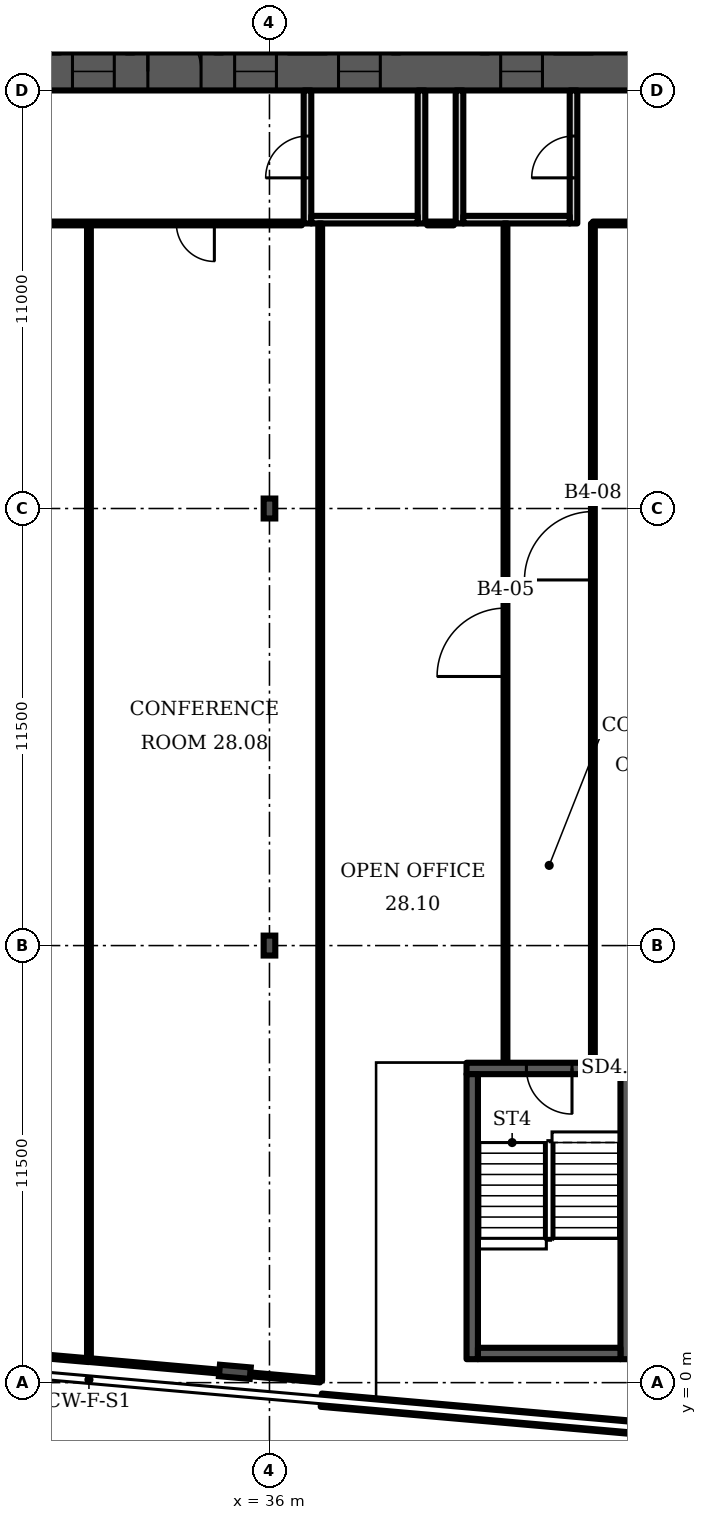
"""IFC4 building model, lengths in metres.
Left out: names, types, materials, properties, quantities, classifications, styles, units other than length and angle.
Written with IfcOpenShell. Run it as: python <this file> out.ifc"""

import sys

from ifc_helpers import new_model, si_unit, direction, frame, frame_2d, origin, origin_2d, place, context, subcontext, project, spatial, rectangle, i_section, extrude, element, fill, save


model = new_model("IFC4")
c1 = context("Model", 3, precision=1e-05, world=origin(), true_north=direction((0.0, 1.0)))
c2 = subcontext(c1, "Body", "Model", "MODEL_VIEW")
j1 = project(units=[si_unit("LENGTHUNIT", "METRE"), si_unit("PLANEANGLEUNIT", "RADIAN")], contexts=[c1])
p1 = place(None, origin())
s1 = spatial("IfcSite", under=j1, at=p1, CompositionType="ELEMENT")
p2 = place(p1, origin())
s2 = spatial("IfcBuilding", under=s1, at=p2, CompositionType="ELEMENT")
p3 = place(p2, frame((0.0, 0.0, 121.9)))
s3 = spatial("IfcBuildingStorey", under=s2, at=p3, CompositionType="ELEMENT", Elevation=121.9)
p4 = place(p3, frame((16.0, 34.5, 0.0), z_axis=(0.0, 0.0, 1.0), x_axis=(1.0, 0.0, 0.0)))
e1 = element("IfcWall", 1, at=p4, inside=s3, PredefinedType="SHEAR", context=c2, shape_type="SweptSolid", body=[
    extrude(rectangle(XDim=49.0, YDim=1.0, at=frame_2d((24.5, 0.0))), origin(), (0.0, 0.0, 1.0), 3.6),
])
p5 = place(p4, frame((1.2, 0.0, 0.0)))
e2 = element("IfcOpeningElement", 2, at=p5, cuts=e1, PredefinedType="OPENING", context=c2, shape_type="SweptSolid", body=[
    extrude(rectangle(XDim=1.1, YDim=2.1, at=frame_2d((0.55, 1.05))), frame((0.0, 0.51, 0.0), z_axis=(0.0, -1.0, 0.0), x_axis=(1.0, 0.0, 0.0)), (0.0, 0.0, 1.0), 1.02),
])
p6 = place(p4, frame((5.083, 0.0, 0.0)))
e3 = element("IfcOpeningElement", 3, at=p6, cuts=e1, PredefinedType="OPENING", context=c2, shape_type="SweptSolid", body=[
    extrude(rectangle(XDim=1.1, YDim=2.1, at=frame_2d((0.55, 1.05))), frame((0.0, 0.51, 0.0), z_axis=(0.0, -1.0, 0.0), x_axis=(1.0, 0.0, 0.0)), (0.0, 0.0, 1.0), 1.02),
])
p7 = place(p4, frame((2.933, 0.0, 0.0)))
e4 = element("IfcOpeningElement", 4, at=p7, cuts=e1, PredefinedType="OPENING", context=c2, shape_type="SweptSolid", body=[
    extrude(rectangle(XDim=1.4, YDim=2.1, at=frame_2d((0.7, 1.05))), frame((0.0, 0.51, 0.0), z_axis=(0.0, -1.0, 0.0), x_axis=(1.0, 0.0, 0.0)), (0.0, 0.0, 1.0), 1.02),
])
p8 = place(p4, frame((7.65, 0.0, 0.0)))
e5 = element("IfcOpeningElement", 5, at=p8, cuts=e1, PredefinedType="OPENING", context=c2, shape_type="SweptSolid", body=[
    extrude(rectangle(XDim=1.2, YDim=2.1, at=frame_2d((0.6, 1.05))), frame((0.0, 0.51, 0.0), z_axis=(0.0, -1.0, 0.0), x_axis=(1.0, 0.0, 0.0)), (0.0, 0.0, 1.0), 1.02),
])
p9 = place(p4, frame((14.817, 0.0, 0.0)))
e6 = element("IfcOpeningElement", 6, at=p9, cuts=e1, PredefinedType="OPENING", context=c2, shape_type="SweptSolid", body=[
    extrude(rectangle(XDim=1.1, YDim=2.1, at=frame_2d((0.55, 1.05))), frame((0.0, 0.51, 0.0), z_axis=(0.0, -1.0, 0.0), x_axis=(1.0, 0.0, 0.0)), (0.0, 0.0, 1.0), 1.02),
])
p10 = place(p4, frame((19.083, 0.0, 0.0)))
e7 = element("IfcOpeningElement", 7, at=p10, cuts=e1, PredefinedType="OPENING", context=c2, shape_type="SweptSolid", body=[
    extrude(rectangle(XDim=1.1, YDim=2.1, at=frame_2d((0.55, 1.05))), frame((0.0, 0.51, 0.0), z_axis=(0.0, -1.0, 0.0), x_axis=(1.0, 0.0, 0.0)), (0.0, 0.0, 1.0), 1.02),
])
p11 = place(p4, frame((16.8, 0.0, 0.0)))
e8 = element("IfcOpeningElement", 8, at=p11, cuts=e1, PredefinedType="OPENING", context=c2, shape_type="SweptSolid", body=[
    extrude(rectangle(XDim=1.4, YDim=2.1, at=frame_2d((0.7, 1.05))), frame((0.0, 0.51, 0.0), z_axis=(0.0, -1.0, 0.0), x_axis=(1.0, 0.0, 0.0)), (0.0, 0.0, 1.0), 1.02),
])
p12 = place(p4, frame((21.817, 0.0, 0.0)))
e9 = element("IfcOpeningElement", 9, at=p12, cuts=e1, PredefinedType="OPENING", context=c2, shape_type="SweptSolid", body=[
    extrude(rectangle(XDim=1.1, YDim=2.1, at=frame_2d((0.55, 1.05))), frame((0.0, 0.51, 0.0), z_axis=(0.0, -1.0, 0.0), x_axis=(1.0, 0.0, 0.0)), (0.0, 0.0, 1.0), 1.02),
])
p13 = place(p4, frame((26.083, 0.0, 0.0)))
e10 = element("IfcOpeningElement", 10, at=p13, cuts=e1, PredefinedType="OPENING", context=c2, shape_type="SweptSolid", body=[
    extrude(rectangle(XDim=1.1, YDim=2.1, at=frame_2d((0.55, 1.05))), frame((0.0, 0.51, 0.0), z_axis=(0.0, -1.0, 0.0), x_axis=(1.0, 0.0, 0.0)), (0.0, 0.0, 1.0), 1.02),
])
p14 = place(p4, frame((33.15, 0.0, 0.0)))
e11 = element("IfcOpeningElement", 11, at=p14, cuts=e1, PredefinedType="OPENING", context=c2, shape_type="SweptSolid", body=[
    extrude(rectangle(XDim=1.2, YDim=2.1, at=frame_2d((0.6, 1.05))), frame((0.0, 0.51, 0.0), z_axis=(0.0, -1.0, 0.0), x_axis=(1.0, 0.0, 0.0)), (0.0, 0.0, 1.0), 1.02),
])
p15 = place(p4, frame((37.8, 0.0, 0.0)))
e12 = element("IfcOpeningElement", 12, at=p15, cuts=e1, PredefinedType="OPENING", context=c2, shape_type="SweptSolid", body=[
    extrude(rectangle(XDim=1.4, YDim=2.1, at=frame_2d((0.7, 1.05))), frame((0.0, 0.51, 0.0), z_axis=(0.0, -1.0, 0.0), x_axis=(1.0, 0.0, 0.0)), (0.0, 0.0, 1.0), 1.02),
])
p16 = place(p4, frame((42.817, 0.0, 0.0)))
e13 = element("IfcOpeningElement", 13, at=p16, cuts=e1, PredefinedType="OPENING", context=c2, shape_type="SweptSolid", body=[
    extrude(rectangle(XDim=1.1, YDim=2.1, at=frame_2d((0.55, 1.05))), frame((0.0, 0.51, 0.0), z_axis=(0.0, -1.0, 0.0), x_axis=(1.0, 0.0, 0.0)), (0.0, 0.0, 1.0), 1.02),
])
p17 = place(p4, frame((46.7, 0.0, 0.0)))
e14 = element("IfcOpeningElement", 14, at=p17, cuts=e1, PredefinedType="OPENING", context=c2, shape_type="SweptSolid", body=[
    extrude(rectangle(XDim=1.1, YDim=2.1, at=frame_2d((0.55, 1.05))), frame((0.0, 0.51, 0.0), z_axis=(0.0, -1.0, 0.0), x_axis=(1.0, 0.0, 0.0)), (0.0, 0.0, 1.0), 1.02),
])
p18 = place(p4, frame((44.667, 0.0, 0.0)))
e15 = element("IfcOpeningElement", 15, at=p18, cuts=e1, PredefinedType="OPENING", context=c2, shape_type="SweptSolid", body=[
    extrude(rectangle(XDim=1.4, YDim=2.1, at=frame_2d((0.7, 1.05))), frame((0.0, 0.51, 0.0), z_axis=(0.0, -1.0, 0.0), x_axis=(1.0, 0.0, 0.0)), (0.0, 0.0, 1.0), 1.02),
])
p19 = place(p3, frame((35.089, 0.285, 0.0), z_axis=(0.0, 0.0, 1.0), x_axis=(-0.087156, -0.996198, 0.0)))
e16 = element("IfcColumn", 16, at=p19, inside=s3, PredefinedType="COLUMN", context=c2, shape_type="SweptSolid", body=[
    extrude(i_section(OverallWidth=0.303, OverallDepth=0.814, WebThickness=0.021, FlangeThickness=0.04, FilletRadius=0.03, at=origin_2d()), origin(), (0.0, 0.0, 1.0), 3.6),
])
for number, where, z_axis, x_axis in (
    (17, (36.0, 11.5, 0.0), (0.0, 0.0, 1.0), (1.0, 0.0, 0.0)),
    (18, (36.0, 23.0, 0.0), (0.0, 0.0, 1.0), (1.0, 0.0, 0.0)),
):
    element("IfcColumn", number, at=place(p3, frame(where, z_axis=z_axis, x_axis=x_axis)), inside=s3, PredefinedType="COLUMN", context=c2, shape_type="SweptSolid", body=[
        extrude(i_section(OverallWidth=0.306, OverallDepth=0.524, WebThickness=0.021, FlangeThickness=0.04, FilletRadius=0.027, at=origin_2d()), origin(), (0.0, 0.0, 1.0), 3.6),
    ])
p20 = place(p3, frame((37.363, -0.461, 0.0), z_axis=(0.0, 0.0, 1.0), x_axis=(0.996194, -0.087159, 0.0)))
e19 = element("IfcWall", 19, at=p20, inside=s3, PredefinedType="SOLIDWALL", context=c2, shape_type="SweptSolid", body=[
    extrude(rectangle(XDim=12.199, YDim=0.35, at=frame_2d((6.099, 0.0))), origin(), (0.0, 0.0, 1.0), 1.0),
])
p21 = place(p3, frame((37.0, 30.5, 0.0), z_axis=(0.0, 0.0, 1.0), x_axis=(0.0, 1.0, 0.0)))
e20 = element("IfcWall", 20, at=p21, inside=s3, PredefinedType="PARTITIONING", context=c2, shape_type="SweptSolid", body=[
    extrude(rectangle(XDim=3.5, YDim=0.2, at=frame_2d((1.75, 0.0))), origin(), (0.0, 0.0, 1.0), 3.2),
])
p22 = place(p21, frame((1.2, 0.0, 0.0)))
e21 = element("IfcOpeningElement", 21, at=p22, cuts=e20, PredefinedType="OPENING", context=c2, shape_type="SweptSolid", body=[
    extrude(rectangle(XDim=1.1, YDim=2.1, at=frame_2d((0.55, 1.05))), frame((0.0, 0.11, 0.0), z_axis=(0.0, -1.0, 0.0), x_axis=(1.0, 0.0, 0.0)), (0.0, 0.0, 1.0), 0.22),
])
p23 = place(p3, frame((40.0, 30.5, 0.0), z_axis=(0.0, 0.0, 1.0), x_axis=(0.0, 1.0, 0.0)))
e22 = element("IfcWall", 22, at=p23, inside=s3, PredefinedType="PARTITIONING", context=c2, shape_type="SweptSolid", body=[
    extrude(rectangle(XDim=3.5, YDim=0.2, at=frame_2d((1.75, 0.0))), origin(), (0.0, 0.0, 1.0), 3.2),
])
p24 = place(p3, frame((37.1, 30.6, 0.0), z_axis=(0.0, 0.0, 1.0), x_axis=(1.0, 0.0, 0.0)))
e23 = element("IfcWall", 23, at=p24, inside=s3, PredefinedType="PARTITIONING", context=c2, shape_type="SweptSolid", body=[
    extrude(rectangle(XDim=2.8, YDim=0.2, at=frame_2d((1.4, 0.0))), origin(), (0.0, 0.0, 1.0), 3.2),
])
p25 = place(p3, frame((41.0, 30.5, 0.0), z_axis=(0.0, 0.0, 1.0), x_axis=(0.0, 1.0, 0.0)))
e24 = element("IfcWall", 24, at=p25, inside=s3, PredefinedType="PARTITIONING", context=c2, shape_type="SweptSolid", body=[
    extrude(rectangle(XDim=3.5, YDim=0.2, at=frame_2d((1.75, 0.0))), origin(), (0.0, 0.0, 1.0), 3.2),
])
p26 = place(p3, frame((44.0, 30.5, 0.0), z_axis=(0.0, 0.0, 1.0), x_axis=(0.0, 1.0, 0.0)))
e25 = element("IfcWall", 25, at=p26, inside=s3, PredefinedType="PARTITIONING", context=c2, shape_type="SweptSolid", body=[
    extrude(rectangle(XDim=3.5, YDim=0.2, at=frame_2d((1.75, 0.0))), origin(), (0.0, 0.0, 1.0), 3.2),
])
p27 = place(p26, frame((1.2, 0.0, 0.0)))
e26 = element("IfcOpeningElement", 26, at=p27, cuts=e25, PredefinedType="OPENING", context=c2, shape_type="SweptSolid", body=[
    extrude(rectangle(XDim=1.1, YDim=2.1, at=frame_2d((0.55, 1.05))), frame((0.0, 0.11, 0.0), z_axis=(0.0, -1.0, 0.0), x_axis=(1.0, 0.0, 0.0)), (0.0, 0.0, 1.0), 0.22),
])
p28 = place(p3, frame((41.1, 30.6, 0.0), z_axis=(0.0, 0.0, 1.0), x_axis=(1.0, 0.0, 0.0)))
e27 = element("IfcWall", 27, at=p28, inside=s3, PredefinedType="PARTITIONING", context=c2, shape_type="SweptSolid", body=[
    extrude(rectangle(XDim=2.8, YDim=0.2, at=frame_2d((1.4, 0.0))), origin(), (0.0, 0.0, 1.0), 3.2),
])
p29 = place(p3, frame((41.185, 8.267, 0.0), z_axis=(0.0, 0.0, 1.0), x_axis=(1.0, 0.0, 0.0)))
e28 = element("IfcWall", 28, at=p29, inside=s3, PredefinedType="SHEAR", context=c2, shape_type="SweptSolid", body=[
    extrude(rectangle(XDim=4.35, YDim=0.3, at=frame_2d((2.175, 0.0))), origin(), (0.0, 0.0, 1.0), 3.2),
])
p30 = place(p29, frame((1.575, 0.0, 0.0)))
e29 = element("IfcOpeningElement", 29, at=p30, cuts=e28, PredefinedType="OPENING", context=c2, shape_type="SweptSolid", body=[
    extrude(rectangle(XDim=1.2, YDim=2.1, at=frame_2d((0.6, 1.05))), frame((0.0, 0.16, 0.0), z_axis=(0.0, -1.0, 0.0), x_axis=(1.0, 0.0, 0.0)), (0.0, 0.0, 1.0), 0.32),
])
p31 = place(p3, frame((17.8, 30.5, 0.0), z_axis=(0.0, 0.0, 1.0), x_axis=(1.0, 0.0, 0.0)))
e30 = element("IfcWall", 30, at=p31, inside=s3, PredefinedType="PARTITIONING", context=c2, shape_type="SweptSolid", body=[
    extrude(rectangle(XDim=19.05, YDim=0.1, at=frame_2d((9.525, 0.0))), origin(), (0.0, 0.0, 1.0), 3.2),
])
p32 = place(p31, frame((2.9, 0.0, 0.0)))
e31 = element("IfcOpeningElement", 31, at=p32, cuts=e30, PredefinedType="OPENING", context=c2, shape_type="SweptSolid", body=[
    extrude(rectangle(XDim=1.8, YDim=2.1, at=frame_2d((0.9, 1.05))), frame((0.0, 0.06, 0.0), z_axis=(0.0, -1.0, 0.0), x_axis=(1.0, 0.0, 0.0)), (0.0, 0.0, 1.0), 0.12),
])
p33 = place(p31, frame((9.99, 0.0, 0.0)))
e32 = element("IfcOpeningElement", 32, at=p33, cuts=e30, PredefinedType="OPENING", context=c2, shape_type="SweptSolid", body=[
    extrude(rectangle(XDim=1.0, YDim=2.1, at=frame_2d((0.5, 1.05))), frame((0.0, 0.06, 0.0), z_axis=(0.0, -1.0, 0.0), x_axis=(1.0, 0.0, 0.0)), (0.0, 0.0, 1.0), 0.12),
])
p34 = place(p31, frame((15.75, 0.0, 0.0)))
e33 = element("IfcOpeningElement", 33, at=p34, cuts=e30, PredefinedType="OPENING", context=c2, shape_type="SweptSolid", body=[
    extrude(rectangle(XDim=1.0, YDim=2.1, at=frame_2d((0.5, 1.05))), frame((0.0, 0.06, 0.0), z_axis=(0.0, -1.0, 0.0), x_axis=(1.0, 0.0, 0.0)), (0.0, 0.0, 1.0), 0.12),
])
p35 = place(p3, frame((31.25, 0.59, 0.0), z_axis=(0.0, 0.0, 1.0), x_axis=(-0.996218, 0.086845, 0.0)))
e34 = element("IfcWall", 34, at=p35, inside=s3, PredefinedType="PARTITIONING", context=c2, shape_type="SweptSolid", body=[
    extrude(rectangle(XDim=6.103, YDim=0.1, at=frame_2d((3.052, 0.0))), origin(), (0.0, 0.0, 1.0), 2.58),
])
p36 = place(p3, frame((31.25, 0.59, 0.0), z_axis=(0.0, 0.0, 1.0), x_axis=(0.0, 1.0, 0.0)))
e35 = element("IfcWall", 35, at=p36, inside=s3, PredefinedType="PARTITIONING", context=c2, shape_type="SweptSolid", body=[
    extrude(rectangle(XDim=29.91, YDim=0.1, at=frame_2d((14.955, 0.0))), origin(), (0.0, 0.0, 1.0), 3.2),
])
p37 = place(p3, frame((37.335, 0.055, 0.0), z_axis=(0.0, 0.0, 1.0), x_axis=(-0.996095, 0.088253, 0.0)))
e36 = element("IfcWall", 36, at=p37, inside=s3, PredefinedType="PARTITIONING", context=c2, shape_type="SweptSolid", body=[
    extrude(rectangle(XDim=6.105, YDim=0.1, at=frame_2d((3.053, 0.0))), origin(), (0.0, 0.0, 1.0), 2.58),
])
p38 = place(p3, frame((37.335, 0.055, 0.0), z_axis=(0.0, 0.0, 1.0), x_axis=(0.0, 1.0, 0.0)))
e37 = element("IfcWall", 37, at=p38, inside=s3, PredefinedType="PARTITIONING", context=c2, shape_type="SweptSolid", body=[
    extrude(rectangle(XDim=30.445, YDim=0.1, at=frame_2d((15.223, 0.0))), origin(), (0.0, 0.0, 1.0), 3.2),
])
p39 = place(p3, frame((42.21, 8.437, 0.0), z_axis=(0.0, 0.0, 1.0), x_axis=(0.0, 1.0, 0.0)))
e38 = element("IfcWall", 38, at=p39, inside=s3, PredefinedType="PARTITIONING", context=c2, shape_type="SweptSolid", body=[
    extrude(rectangle(XDim=22.063, YDim=0.1, at=frame_2d((11.031, 0.0))), origin(), (0.0, 0.0, 1.0), 3.2),
])
p40 = place(p39, frame((10.143, 0.0, 0.0)))
e39 = element("IfcOpeningElement", 39, at=p40, cuts=e38, PredefinedType="OPENING", context=c2, shape_type="SweptSolid", body=[
    extrude(rectangle(XDim=1.8, YDim=2.1, at=frame_2d((0.9, 1.05))), frame((0.0, 0.06, 0.0), z_axis=(0.0, -1.0, 0.0), x_axis=(1.0, 0.0, 0.0)), (0.0, 0.0, 1.0), 0.12),
])
p41 = place(p3, frame((44.51, 8.437, 0.0), z_axis=(0.0, 0.0, 1.0), x_axis=(0.0, 1.0, 0.0)))
e40 = element("IfcWall", 40, at=p41, inside=s3, PredefinedType="PARTITIONING", context=c2, shape_type="SweptSolid", body=[
    extrude(rectangle(XDim=22.063, YDim=0.1, at=frame_2d((11.031, 0.0))), origin(), (0.0, 0.0, 1.0), 3.2),
])
p42 = place(p41, frame((12.683, 0.0, 0.0)))
e41 = element("IfcOpeningElement", 41, at=p42, cuts=e40, PredefinedType="OPENING", context=c2, shape_type="SweptSolid", body=[
    extrude(rectangle(XDim=1.8, YDim=2.1, at=frame_2d((0.9, 1.05))), frame((0.0, 0.06, 0.0), z_axis=(0.0, -1.0, 0.0), x_axis=(1.0, 0.0, 0.0)), (0.0, 0.0, 1.0), 0.12),
])
p43 = place(p3, frame((44.51, 30.5, 0.0), z_axis=(0.0, 0.0, 1.0), x_axis=(1.0, 0.0, 0.0)))
e42 = element("IfcWall", 42, at=p43, inside=s3, PredefinedType="PARTITIONING", context=c2, shape_type="SweptSolid", body=[
    extrude(rectangle(XDim=19.59, YDim=0.1, at=frame_2d((9.795, 0.0))), origin(), (0.0, 0.0, 1.0), 3.2),
])
p44 = place(p43, frame((6.41, 0.0, 0.0)))
e43 = element("IfcOpeningElement", 43, at=p44, cuts=e42, PredefinedType="OPENING", context=c2, shape_type="SweptSolid", body=[
    extrude(rectangle(XDim=1.0, YDim=2.1, at=frame_2d((0.5, 1.05))), frame((0.0, 0.06, 0.0), z_axis=(0.0, -1.0, 0.0), x_axis=(1.0, 0.0, 0.0)), (0.0, 0.0, 1.0), 0.12),
])
p45 = place(p43, frame((10.41, 0.0, 0.0)))
e44 = element("IfcOpeningElement", 44, at=p45, cuts=e42, PredefinedType="OPENING", context=c2, shape_type="SweptSolid", body=[
    extrude(rectangle(XDim=1.0, YDim=2.1, at=frame_2d((0.5, 1.05))), frame((0.0, 0.06, 0.0), z_axis=(0.0, -1.0, 0.0), x_axis=(1.0, 0.0, 0.0)), (0.0, 0.0, 1.0), 0.12),
])
p46 = place(p3, frame((40.15, 30.5, 0.0), z_axis=(0.0, 0.0, 1.0), x_axis=(1.0, 0.0, 0.0)))
e45 = element("IfcWall", 45, at=p46, inside=s3, PredefinedType="PARTITIONING", context=c2, shape_type="SweptSolid", body=[
    extrude(rectangle(XDim=0.7, YDim=0.1, at=frame_2d((0.35, 0.0))), origin(), (0.0, 0.0, 1.0), 3.2),
])
for number, where, z_axis, x_axis in (
    (46, (41.335, 0.617, 0.0), (0.0, 0.0, 1.0), (0.0, 1.0, 0.0)),
    (47, (45.385, 0.617, 0.0), (0.0, 0.0, 1.0), (0.0, 1.0, 0.0)),
):
    element("IfcWall", number, at=place(p3, frame(where, z_axis=z_axis, x_axis=x_axis)), inside=s3, PredefinedType="SHEAR", context=c2, shape_type="SweptSolid", body=[
        extrude(rectangle(XDim=7.5, YDim=0.3, at=frame_2d((3.75, 0.0))), origin(), (0.0, 0.0, 1.0), 3.2),
    ])
p47 = place(p3, frame((41.485, 0.767, 0.0), z_axis=(0.0, 0.0, 1.0), x_axis=(1.0, 0.0, 0.0)))
e48 = element("IfcWall", 48, at=p47, inside=s3, PredefinedType="SHEAR", context=c2, shape_type="SweptSolid", body=[
    extrude(rectangle(XDim=3.75, YDim=0.3, at=frame_2d((1.875, 0.0))), origin(), (0.0, 0.0, 1.0), 3.2),
])
p48 = place(p9, origin())
e49 = element("IfcDoor", 49, at=p48, inside=s3, OperationType="DOUBLE_DOOR_SLIDING", PredefinedType="DOOR", context=c2, shape_type="SweptSolid", body=[
    extrude(rectangle(XDim=1.1, YDim=2.1, at=frame_2d((0.55, 1.05))), frame((0.0, 0.025, 0.0), z_axis=(0.0, -1.0, 0.0), x_axis=(1.0, 0.0, 0.0)), (0.0, 0.0, 1.0), 0.05),
])
fill(e6, e49)
p49 = place(p10, origin())
e50 = element("IfcDoor", 50, at=p49, inside=s3, OperationType="DOUBLE_DOOR_SLIDING", PredefinedType="DOOR", context=c2, shape_type="SweptSolid", body=[
    extrude(rectangle(XDim=1.1, YDim=2.1, at=frame_2d((0.55, 1.05))), frame((0.0, 0.025, 0.0), z_axis=(0.0, -1.0, 0.0), x_axis=(1.0, 0.0, 0.0)), (0.0, 0.0, 1.0), 0.05),
])
fill(e7, e50)
p50 = place(p11, origin())
e51 = element("IfcDoor", 51, at=p50, inside=s3, OperationType="DOUBLE_DOOR_SINGLE_SWING", PredefinedType="DOOR", context=c2, shape_type="SweptSolid", body=[
    extrude(rectangle(XDim=1.4, YDim=2.1, at=frame_2d((0.7, 1.05))), frame((0.0, 0.025, 0.0), z_axis=(0.0, -1.0, 0.0), x_axis=(1.0, 0.0, 0.0)), (0.0, 0.0, 1.0), 0.05),
])
fill(e8, e51)
p51 = place(p12, origin())
e52 = element("IfcDoor", 52, at=p51, inside=s3, OperationType="DOUBLE_DOOR_SLIDING", PredefinedType="DOOR", context=c2, shape_type="SweptSolid", body=[
    extrude(rectangle(XDim=1.1, YDim=2.1, at=frame_2d((0.55, 1.05))), frame((0.0, 0.025, 0.0), z_axis=(0.0, -1.0, 0.0), x_axis=(1.0, 0.0, 0.0)), (0.0, 0.0, 1.0), 0.05),
])
fill(e9, e52)
p52 = place(p13, origin())
e53 = element("IfcDoor", 53, at=p52, inside=s3, OperationType="DOUBLE_DOOR_SLIDING", PredefinedType="DOOR", context=c2, shape_type="SweptSolid", body=[
    extrude(rectangle(XDim=1.1, YDim=2.1, at=frame_2d((0.55, 1.05))), frame((0.0, 0.025, 0.0), z_axis=(0.0, -1.0, 0.0), x_axis=(1.0, 0.0, 0.0)), (0.0, 0.0, 1.0), 0.05),
])
fill(e10, e53)
p53 = place(p22, origin())
e54 = element("IfcDoor", 54, at=p53, inside=s3, OperationType="SINGLE_SWING_LEFT", PredefinedType="DOOR", context=c2, shape_type="SweptSolid", body=[
    extrude(rectangle(XDim=1.1, YDim=2.1, at=frame_2d((0.55, 1.05))), frame((0.0, 0.025, 0.0), z_axis=(0.0, -1.0, 0.0), x_axis=(1.0, 0.0, 0.0)), (0.0, 0.0, 1.0), 0.05),
])
fill(e21, e54)
p54 = place(p27, origin())
e55 = element("IfcDoor", 55, at=p54, inside=s3, OperationType="SINGLE_SWING_LEFT", PredefinedType="DOOR", context=c2, shape_type="SweptSolid", body=[
    extrude(rectangle(XDim=1.1, YDim=2.1, at=frame_2d((0.55, 1.05))), frame((0.0, 0.025, 0.0), z_axis=(0.0, -1.0, 0.0), x_axis=(1.0, 0.0, 0.0)), (0.0, 0.0, 1.0), 0.05),
])
fill(e26, e55)
p55 = place(p30, origin())
e56 = element("IfcDoor", 56, at=p55, inside=s3, OperationType="SINGLE_SWING_RIGHT", PredefinedType="DOOR", context=c2, shape_type="SweptSolid", body=[
    extrude(rectangle(XDim=1.2, YDim=2.1, at=frame_2d((0.6, 1.05))), frame((0.0, 0.025, 0.0), z_axis=(0.0, -1.0, 0.0), x_axis=(1.0, 0.0, 0.0)), (0.0, 0.0, 1.0), 0.05),
])
fill(e29, e56)
p56 = place(p40, origin())
e57 = element("IfcDoor", 57, at=p56, inside=s3, OperationType="DOUBLE_DOOR_SINGLE_SWING", PredefinedType="DOOR", context=c2, shape_type="SweptSolid", body=[
    extrude(rectangle(XDim=1.8, YDim=2.1, at=frame_2d((0.9, 1.05))), frame((0.0, 0.025, 0.0), z_axis=(0.0, -1.0, 0.0), x_axis=(1.0, 0.0, 0.0)), (0.0, 0.0, 1.0), 0.05),
])
fill(e39, e57)
p57 = place(p42, origin())
e58 = element("IfcDoor", 58, at=p57, inside=s3, OperationType="DOUBLE_DOOR_SINGLE_SWING", PredefinedType="DOOR", context=c2, shape_type="SweptSolid", body=[
    extrude(rectangle(XDim=1.8, YDim=2.1, at=frame_2d((0.9, 1.05))), frame((0.0, 0.025, 0.0), z_axis=(0.0, -1.0, 0.0), x_axis=(1.0, 0.0, 0.0)), (0.0, 0.0, 1.0), 0.05),
])
fill(e41, e58)
p58 = place(p34, origin())
e59 = element("IfcDoor", 59, at=p58, inside=s3, OperationType="SINGLE_SWING_RIGHT", PredefinedType="DOOR", context=c2, shape_type="SweptSolid", body=[
    extrude(rectangle(XDim=1.0, YDim=2.1, at=frame_2d((0.5, 1.05))), frame((0.0, 0.025, 0.0), z_axis=(0.0, -1.0, 0.0), x_axis=(1.0, 0.0, 0.0)), (0.0, 0.0, 1.0), 0.05),
])
fill(e33, e59)
save(model, sys.argv[1])
